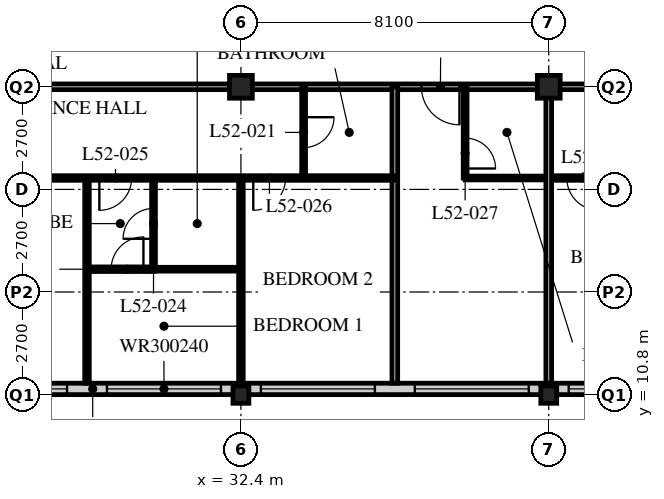
"""IFC4 building model, lengths in metres.
Left out: names, types, materials, properties, quantities, classifications, styles, units other than length and angle.
Written with IfcOpenShell. Run it as: python <this file> out.ifc"""

import sys

from ifc_helpers import new_model, si_unit, direction, frame, frame_2d, origin, origin_2d, place, context, subcontext, project, spatial, rectangle, hollow_rectangle, i_section, extrude, element, fill, save


model = new_model("IFC4")
c1 = context("Model", 3, precision=1e-05, world=origin(), true_north=direction((0.0, 1.0)))
c2 = subcontext(c1, "Body", "Model", "MODEL_VIEW")
j1 = project(units=[si_unit("LENGTHUNIT", "METRE"), si_unit("PLANEANGLEUNIT", "RADIAN")], contexts=[c1])
p1 = place(None, origin())
s1 = spatial("IfcSite", under=j1, at=p1, CompositionType="ELEMENT")
p2 = place(p1, origin())
s2 = spatial("IfcBuilding", under=s1, at=p2, CompositionType="ELEMENT")
p3 = place(p2, frame((0.0, 0.0, 202.8)))
s3 = spatial("IfcBuildingStorey", under=s2, at=p3, CompositionType="ELEMENT", Elevation=202.8)
p4 = place(p3, frame((32.4, 10.8, 0.0), z_axis=(0.0, 0.0, 1.0), x_axis=(1.0, 0.0, 0.0)))
e1 = element("IfcColumn", 1, at=p4, inside=s3, PredefinedType="COLUMN", context=c2, shape_type="SweptSolid", body=[
    extrude(i_section(OverallWidth=0.418, OverallDepth=0.456, WebThickness=0.042, FlangeThickness=0.067, FilletRadius=0.015, at=origin_2d()), origin(), (0.0, 0.0, 1.0), 3.6),
])
p5 = place(p3, frame((32.4, 18.9, 0.0), z_axis=(0.0, 0.0, 1.0), x_axis=(1.0, 0.0, 0.0)))
e2 = element("IfcColumn", 2, at=p5, inside=s3, PredefinedType="COLUMN", context=c2, shape_type="SweptSolid", body=[
    extrude(hollow_rectangle(XDim=0.6, YDim=0.6, WallThickness=0.05, at=origin_2d()), origin(), (0.0, 0.0, 1.0), 3.6),
])
p6 = place(p3, frame((40.5, 10.8, 0.0), z_axis=(0.0, 0.0, 1.0), x_axis=(1.0, 0.0, 0.0)))
e3 = element("IfcColumn", 3, at=p6, inside=s3, PredefinedType="COLUMN", context=c2, shape_type="SweptSolid", body=[
    extrude(i_section(OverallWidth=0.418, OverallDepth=0.456, WebThickness=0.042, FlangeThickness=0.067, FilletRadius=0.015, at=origin_2d()), origin(), (0.0, 0.0, 1.0), 3.6),
])
p7 = place(p3, frame((40.5, 18.9, 0.0), z_axis=(0.0, 0.0, 1.0), x_axis=(1.0, 0.0, 0.0)))
e4 = element("IfcColumn", 4, at=p7, inside=s3, PredefinedType="COLUMN", context=c2, shape_type="SweptSolid", body=[
    extrude(hollow_rectangle(XDim=0.6, YDim=0.6, WallThickness=0.05, at=origin_2d()), origin(), (0.0, 0.0, 1.0), 3.6),
])
p8 = place(p3, frame((8.4, 10.95, 0.0), z_axis=(0.0, 0.0, 1.0), x_axis=(1.0, 0.0, 0.0)))
e5 = element("IfcWall", 5, at=p8, inside=s3, PredefinedType="SOLIDWALL", context=c2, shape_type="SweptSolid", body=[
    extrude(rectangle(XDim=40.2, YDim=0.3, at=frame_2d((20.1, 0.0))), origin(), (0.0, 0.0, 1.0), 3.39),
])
p9 = place(p8, frame((0.225, 0.0, 0.6)))
e6 = element("IfcOpeningElement", 6, at=p9, cuts=e5, PredefinedType="OPENING", context=c2, shape_type="SweptSolid", body=[
    extrude(rectangle(XDim=3.0, YDim=2.4, at=frame_2d((1.5, 1.2))), frame((0.0, 0.16, 0.0), z_axis=(0.0, -1.0, 0.0), x_axis=(1.0, 0.0, 0.0)), (0.0, 0.0, 1.0), 0.32),
])
p10 = place(p8, frame((4.275, 0.0, 0.6)))
e7 = element("IfcOpeningElement", 7, at=p10, cuts=e5, PredefinedType="OPENING", context=c2, shape_type="SweptSolid", body=[
    extrude(rectangle(XDim=3.0, YDim=2.4, at=frame_2d((1.5, 1.2))), frame((0.0, 0.16, 0.0), z_axis=(0.0, -1.0, 0.0), x_axis=(1.0, 0.0, 0.0)), (0.0, 0.0, 1.0), 0.32),
])
p11 = place(p8, frame((8.325, 0.0, 0.6)))
e8 = element("IfcOpeningElement", 8, at=p11, cuts=e5, PredefinedType="OPENING", context=c2, shape_type="SweptSolid", body=[
    extrude(rectangle(XDim=3.0, YDim=2.4, at=frame_2d((1.5, 1.2))), frame((0.0, 0.16, 0.0), z_axis=(0.0, -1.0, 0.0), x_axis=(1.0, 0.0, 0.0)), (0.0, 0.0, 1.0), 0.32),
])
p12 = place(p8, frame((12.375, 0.0, 0.6)))
e9 = element("IfcOpeningElement", 9, at=p12, cuts=e5, PredefinedType="OPENING", context=c2, shape_type="SweptSolid", body=[
    extrude(rectangle(XDim=3.0, YDim=2.4, at=frame_2d((1.5, 1.2))), frame((0.0, 0.16, 0.0), z_axis=(0.0, -1.0, 0.0), x_axis=(1.0, 0.0, 0.0)), (0.0, 0.0, 1.0), 0.32),
])
p13 = place(p8, frame((16.425, 0.0, 0.6)))
e10 = element("IfcOpeningElement", 10, at=p13, cuts=e5, PredefinedType="OPENING", context=c2, shape_type="SweptSolid", body=[
    extrude(rectangle(XDim=3.0, YDim=2.4, at=frame_2d((1.5, 1.2))), frame((0.0, 0.16, 0.0), z_axis=(0.0, -1.0, 0.0), x_axis=(1.0, 0.0, 0.0)), (0.0, 0.0, 1.0), 0.32),
])
p14 = place(p8, frame((20.475, 0.0, 0.6)))
e11 = element("IfcOpeningElement", 11, at=p14, cuts=e5, PredefinedType="OPENING", context=c2, shape_type="SweptSolid", body=[
    extrude(rectangle(XDim=3.0, YDim=2.4, at=frame_2d((1.5, 1.2))), frame((0.0, 0.16, 0.0), z_axis=(0.0, -1.0, 0.0), x_axis=(1.0, 0.0, 0.0)), (0.0, 0.0, 1.0), 0.32),
])
p15 = place(p8, frame((24.525, 0.0, 0.6)))
e12 = element("IfcOpeningElement", 12, at=p15, cuts=e5, PredefinedType="OPENING", context=c2, shape_type="SweptSolid", body=[
    extrude(rectangle(XDim=3.0, YDim=2.4, at=frame_2d((1.5, 1.2))), frame((0.0, 0.16, 0.0), z_axis=(0.0, -1.0, 0.0), x_axis=(1.0, 0.0, 0.0)), (0.0, 0.0, 1.0), 0.32),
])
p16 = place(p8, frame((28.575, 0.0, 0.6)))
e13 = element("IfcOpeningElement", 13, at=p16, cuts=e5, PredefinedType="OPENING", context=c2, shape_type="SweptSolid", body=[
    extrude(rectangle(XDim=3.0, YDim=2.4, at=frame_2d((1.5, 1.2))), frame((0.0, 0.16, 0.0), z_axis=(0.0, -1.0, 0.0), x_axis=(1.0, 0.0, 0.0)), (0.0, 0.0, 1.0), 0.32),
])
p17 = place(p8, frame((32.625, 0.0, 0.6)))
e14 = element("IfcOpeningElement", 14, at=p17, cuts=e5, PredefinedType="OPENING", context=c2, shape_type="SweptSolid", body=[
    extrude(rectangle(XDim=3.0, YDim=2.4, at=frame_2d((1.5, 1.2))), frame((0.0, 0.16, 0.0), z_axis=(0.0, -1.0, 0.0), x_axis=(1.0, 0.0, 0.0)), (0.0, 0.0, 1.0), 0.32),
])
p18 = place(p8, frame((36.675, 0.0, 0.6)))
e15 = element("IfcOpeningElement", 15, at=p18, cuts=e5, PredefinedType="OPENING", context=c2, shape_type="SweptSolid", body=[
    extrude(rectangle(XDim=3.0, YDim=2.4, at=frame_2d((1.5, 1.2))), frame((0.0, 0.16, 0.0), z_axis=(0.0, -1.0, 0.0), x_axis=(1.0, 0.0, 0.0)), (0.0, 0.0, 1.0), 0.32),
])
p19 = place(p3, frame((8.1, 18.9, 0.0), z_axis=(0.0, 0.0, 1.0), x_axis=(1.0, 0.0, 0.0)))
e16 = element("IfcWall", 16, at=p19, inside=s3, PredefinedType="PARTITIONING", context=c2, shape_type="SweptSolid", body=[
    extrude(rectangle(XDim=36.45, YDim=0.15, at=frame_2d((18.225, 0.0))), origin(), (0.0, 0.0, 1.0), 2.778),
])
p20 = place(p19, frame((4.45, 0.0, 0.0)))
e17 = element("IfcOpeningElement", 17, at=p20, cuts=e16, PredefinedType="OPENING", context=c2, shape_type="SweptSolid", body=[
    extrude(rectangle(XDim=1.0, YDim=2.1, at=frame_2d((0.5, 1.05))), frame((0.0, 0.085, 0.0), z_axis=(0.0, -1.0, 0.0), x_axis=(1.0, 0.0, 0.0)), (0.0, 0.0, 1.0), 0.17),
])
p21 = place(p19, frame((12.55, 0.0, 0.0)))
e18 = element("IfcOpeningElement", 18, at=p21, cuts=e16, PredefinedType="OPENING", context=c2, shape_type="SweptSolid", body=[
    extrude(rectangle(XDim=1.0, YDim=2.1, at=frame_2d((0.5, 1.05))), frame((0.0, 0.085, 0.0), z_axis=(0.0, -1.0, 0.0), x_axis=(1.0, 0.0, 0.0)), (0.0, 0.0, 1.0), 0.17),
])
p22 = place(p19, frame((29.05, 0.0, 0.0)))
e19 = element("IfcOpeningElement", 19, at=p22, cuts=e16, PredefinedType="OPENING", context=c2, shape_type="SweptSolid", body=[
    extrude(rectangle(XDim=1.0, YDim=2.1, at=frame_2d((0.5, 1.05))), frame((0.0, 0.085, 0.0), z_axis=(0.0, -1.0, 0.0), x_axis=(1.0, 0.0, 0.0)), (0.0, 0.0, 1.0), 0.17),
])
p23 = place(p19, frame((2.625, 0.0, 0.0)))
e20 = element("IfcOpeningElement", 20, at=p23, cuts=e16, PredefinedType="OPENING", context=c2, shape_type="SweptSolid", body=[
    extrude(rectangle(XDim=1.0, YDim=2.1, at=frame_2d((0.5, 1.05))), frame((0.0, 0.085, 0.0), z_axis=(0.0, -1.0, 0.0), x_axis=(1.0, 0.0, 0.0)), (0.0, 0.0, 1.0), 0.17),
])
p24 = place(p19, frame((33.925, 0.0, 0.0)))
e21 = element("IfcOpeningElement", 21, at=p24, cuts=e16, PredefinedType="OPENING", context=c2, shape_type="SweptSolid", body=[
    extrude(rectangle(XDim=1.0, YDim=2.1, at=frame_2d((0.5, 1.05))), frame((0.0, 0.085, 0.0), z_axis=(0.0, -1.0, 0.0), x_axis=(1.0, 0.0, 0.0)), (0.0, 0.0, 1.0), 0.17),
])
p25 = place(p3, frame((34.05, 18.9, 0.0), z_axis=(0.0, 0.0, 1.0), x_axis=(0.0, -1.0, 0.0)))
e22 = element("IfcWall", 22, at=p25, inside=s3, PredefinedType="PARTITIONING", context=c2, shape_type="SweptSolid", body=[
    extrude(rectangle(XDim=2.4, YDim=0.1, at=frame_2d((1.2, 0.0))), origin(), (0.0, 0.0, 1.0), 3.39),
])
p26 = place(p25, frame((0.8, 0.0, 0.0)))
e23 = element("IfcOpeningElement", 23, at=p26, cuts=e22, PredefinedType="OPENING", context=c2, shape_type="SweptSolid", body=[
    extrude(rectangle(XDim=0.8, YDim=2.1, at=frame_2d((0.4, 1.05))), frame((0.0, 0.06, 0.0), z_axis=(0.0, -1.0, 0.0), x_axis=(1.0, 0.0, 0.0)), (0.0, 0.0, 1.0), 0.12),
])
p27 = place(p3, frame((30.1, 16.5, 0.0), z_axis=(0.0, 0.0, 1.0), x_axis=(0.0, -1.0, 0.0)))
e24 = element("IfcWall", 24, at=p27, inside=s3, PredefinedType="PARTITIONING", context=c2, shape_type="SweptSolid", body=[
    extrude(rectangle(XDim=2.4, YDim=0.1, at=frame_2d((1.2, 0.0))), origin(), (0.0, 0.0, 1.0), 3.39),
])
p28 = place(p27, frame((0.8, 0.0, 0.0)))
e25 = element("IfcOpeningElement", 25, at=p28, cuts=e24, PredefinedType="OPENING", context=c2, shape_type="SweptSolid", body=[
    extrude(rectangle(XDim=0.8, YDim=2.1, at=frame_2d((0.4, 1.05))), frame((0.0, 0.06, 0.0), z_axis=(0.0, -1.0, 0.0), x_axis=(1.0, 0.0, 0.0)), (0.0, 0.0, 1.0), 0.12),
])
p29 = place(p3, frame((30.1, 14.1, 0.0), z_axis=(0.0, 0.0, 1.0), x_axis=(1.0, 0.0, 0.0)))
e26 = element("IfcWall", 26, at=p29, inside=s3, PredefinedType="PARTITIONING", context=c2, shape_type="SweptSolid", body=[
    extrude(rectangle(XDim=2.3, YDim=0.1, at=frame_2d((1.15, 0.0))), origin(), (0.0, 0.0, 1.0), 3.39),
])
p30 = place(p3, frame((28.35, 16.5, 0.0), z_axis=(0.0, 0.0, 1.0), x_axis=(0.0, -1.0, 0.0)))
e27 = element("IfcWall", 27, at=p30, inside=s3, PredefinedType="PARTITIONING", context=c2, shape_type="SweptSolid", body=[
    extrude(rectangle(XDim=5.4, YDim=0.12, at=frame_2d((2.7, 0.0))), origin(), (0.0, 0.0, 1.0), 3.39),
])
p31 = place(p3, frame((32.4, 16.5, 0.0), z_axis=(0.0, 0.0, 1.0), x_axis=(0.0, -1.0, 0.0)))
e28 = element("IfcWall", 28, at=p31, inside=s3, PredefinedType="PARTITIONING", context=c2, shape_type="SweptSolid", body=[
    extrude(rectangle(XDim=5.4, YDim=0.12, at=frame_2d((2.7, 0.0))), origin(), (0.0, 0.0, 1.0), 2.778),
])
p32 = place(p3, frame((36.45, 18.9, 0.0), z_axis=(0.0, 0.0, 1.0), x_axis=(0.0, -1.0, 0.0)))
e29 = element("IfcWall", 29, at=p32, inside=s3, PredefinedType="PARTITIONING", context=c2, shape_type="SweptSolid", body=[
    extrude(rectangle(XDim=7.8, YDim=0.15, at=frame_2d((3.9, 0.0))), origin(), (0.0, 0.0, 1.0), 3.39),
])
p33 = place(p3, frame((38.3, 16.5, 0.0), z_axis=(0.0, 0.0, 1.0), x_axis=(1.0, 0.0, 0.0)))
e30 = element("IfcWall", 30, at=p33, inside=s3, PredefinedType="PARTITIONING", context=c2, shape_type="SweptSolid", body=[
    extrude(rectangle(XDim=2.2, YDim=0.1, at=frame_2d((1.1, 0.0))), origin(), (0.0, 0.0, 1.0), 3.39),
])
p34 = place(p3, frame((38.3, 18.9, 0.0), z_axis=(0.0, 0.0, 1.0), x_axis=(0.0, -1.0, 0.0)))
e31 = element("IfcWall", 31, at=p34, inside=s3, PredefinedType="PARTITIONING", context=c2, shape_type="SweptSolid", body=[
    extrude(rectangle(XDim=2.4, YDim=0.1, at=frame_2d((1.2, 0.0))), origin(), (0.0, 0.0, 1.0), 3.39),
])
p35 = place(p34, frame((1.35, 0.0, 0.0)))
e32 = element("IfcOpeningElement", 32, at=p35, cuts=e31, PredefinedType="OPENING", context=c2, shape_type="SweptSolid", body=[
    extrude(rectangle(XDim=0.8, YDim=2.1, at=frame_2d((0.4, 1.05))), frame((0.0, 0.06, 0.0), z_axis=(0.0, -1.0, 0.0), x_axis=(1.0, 0.0, 0.0)), (0.0, 0.0, 1.0), 0.12),
])
p36 = place(p3, frame((8.1, 16.5, 0.0), z_axis=(0.0, 0.0, 1.0), x_axis=(1.0, 0.0, 0.0)))
e33 = element("IfcWall", 33, at=p36, inside=s3, PredefinedType="PARTITIONING", context=c2, shape_type="SweptSolid", body=[
    extrude(rectangle(XDim=28.35, YDim=0.12, at=frame_2d((14.175, 0.0))), origin(), (0.0, 0.0, 1.0), 3.39),
])
p37 = place(p36, frame((5.025, 0.0, 0.0)))
e34 = element("IfcOpeningElement", 34, at=p37, cuts=e33, PredefinedType="OPENING", context=c2, shape_type="SweptSolid", body=[
    extrude(rectangle(XDim=0.85, YDim=2.1, at=frame_2d((0.425, 1.05))), frame((0.0, 0.07, 0.0), z_axis=(0.0, -1.0, 0.0), x_axis=(1.0, 0.0, 0.0)), (0.0, 0.0, 1.0), 0.14),
])
p38 = place(p36, frame((8.425, 0.0, 0.0)))
e35 = element("IfcOpeningElement", 35, at=p38, cuts=e33, PredefinedType="OPENING", context=c2, shape_type="SweptSolid", body=[
    extrude(rectangle(XDim=0.85, YDim=2.1, at=frame_2d((0.425, 1.05))), frame((0.0, 0.07, 0.0), z_axis=(0.0, -1.0, 0.0), x_axis=(1.0, 0.0, 0.0)), (0.0, 0.0, 1.0), 0.14),
])
p39 = place(p36, frame((13.125, 0.0, 0.0)))
e36 = element("IfcOpeningElement", 36, at=p39, cuts=e33, PredefinedType="OPENING", context=c2, shape_type="SweptSolid", body=[
    extrude(rectangle(XDim=0.85, YDim=2.1, at=frame_2d((0.425, 1.05))), frame((0.0, 0.07, 0.0), z_axis=(0.0, -1.0, 0.0), x_axis=(1.0, 0.0, 0.0)), (0.0, 0.0, 1.0), 0.14),
])
p40 = place(p36, frame((20.575, 0.0, 0.0)))
e37 = element("IfcOpeningElement", 37, at=p40, cuts=e33, PredefinedType="OPENING", context=c2, shape_type="SweptSolid", body=[
    extrude(rectangle(XDim=0.85, YDim=2.1, at=frame_2d((0.425, 1.05))), frame((0.0, 0.07, 0.0), z_axis=(0.0, -1.0, 0.0), x_axis=(1.0, 0.0, 0.0)), (0.0, 0.0, 1.0), 0.14),
])
p41 = place(p36, frame((24.625, 0.0, 0.0)))
e38 = element("IfcOpeningElement", 38, at=p41, cuts=e33, PredefinedType="OPENING", context=c2, shape_type="SweptSolid", body=[
    extrude(rectangle(XDim=0.85, YDim=2.1, at=frame_2d((0.425, 1.05))), frame((0.0, 0.07, 0.0), z_axis=(0.0, -1.0, 0.0), x_axis=(1.0, 0.0, 0.0)), (0.0, 0.0, 1.0), 0.14),
])
p42 = place(p36, frame((2.725, 0.0, 0.0)))
e39 = element("IfcOpeningElement", 39, at=p42, cuts=e33, PredefinedType="OPENING", context=c2, shape_type="SweptSolid", body=[
    extrude(rectangle(XDim=0.85, YDim=2.1, at=frame_2d((0.425, 1.05))), frame((0.0, 0.07, 0.0), z_axis=(0.0, -1.0, 0.0), x_axis=(1.0, 0.0, 0.0)), (0.0, 0.0, 1.0), 0.14),
])
p43 = place(p3, frame((40.5, 16.5, 0.0), z_axis=(0.0, 0.0, 1.0), x_axis=(1.0, 0.0, 0.0)))
e40 = element("IfcWall", 40, at=p43, inside=s3, PredefinedType="PARTITIONING", context=c2, shape_type="SweptSolid", body=[
    extrude(rectangle(XDim=8.05, YDim=0.12, at=frame_2d((4.025, 0.0))), origin(), (0.0, 0.0, 1.0), 3.39),
])
p44 = place(p43, frame((0.475, 0.0, 0.0)))
e41 = element("IfcOpeningElement", 41, at=p44, cuts=e40, PredefinedType="OPENING", context=c2, shape_type="SweptSolid", body=[
    extrude(rectangle(XDim=0.85, YDim=2.1, at=frame_2d((0.425, 1.05))), frame((0.0, 0.07, 0.0), z_axis=(0.0, -1.0, 0.0), x_axis=(1.0, 0.0, 0.0)), (0.0, 0.0, 1.0), 0.14),
])
p45 = place(p43, frame((4.325, 0.0, 0.0)))
e42 = element("IfcOpeningElement", 42, at=p45, cuts=e40, PredefinedType="OPENING", context=c2, shape_type="SweptSolid", body=[
    extrude(rectangle(XDim=0.85, YDim=2.1, at=frame_2d((0.425, 1.05))), frame((0.0, 0.07, 0.0), z_axis=(0.0, -1.0, 0.0), x_axis=(1.0, 0.0, 0.0)), (0.0, 0.0, 1.0), 0.14),
])
p46 = place(p3, frame((40.5, 18.9, 0.0), z_axis=(0.0, 0.0, 1.0), x_axis=(0.0, -1.0, 0.0)))
e43 = element("IfcWall", 43, at=p46, inside=s3, PredefinedType="PARTITIONING", context=c2, shape_type="SweptSolid", body=[
    extrude(rectangle(XDim=7.8, YDim=0.15, at=frame_2d((3.9, 0.0))), origin(), (0.0, 0.0, 1.0), 2.778),
])
p47 = place(p3, frame((30.11, 14.1, 0.0), z_axis=(0.0, 0.0, 1.0), x_axis=(-1.0, 0.0, 0.0)))
e44 = element("IfcWall", 44, at=p47, inside=s3, PredefinedType="PARTITIONING", context=c2, shape_type="SweptSolid", body=[
    extrude(rectangle(XDim=1.76, YDim=0.12, at=frame_2d((0.88, 0.0))), origin(), (0.0, 0.0, 1.0), 3.39),
])
p48 = place(p47, frame((0.275, 0.0, 0.0)))
e45 = element("IfcOpeningElement", 45, at=p48, cuts=e44, PredefinedType="OPENING", context=c2, shape_type="SweptSolid", body=[
    extrude(rectangle(XDim=0.85, YDim=2.1, at=frame_2d((0.425, 1.05))), frame((0.0, 0.07, 0.0), z_axis=(0.0, -1.0, 0.0), x_axis=(1.0, 0.0, 0.0)), (0.0, 0.0, 1.0), 0.14),
])
p49 = place(p13, origin())
e46 = element("IfcWindow", 46, at=p49, inside=s3, PartitioningType="SINGLE_PANEL", PredefinedType="WINDOW", context=c2, shape_type="SweptSolid", body=[
    extrude(rectangle(XDim=3.0, YDim=2.4, at=frame_2d((1.5, 1.2))), frame((0.0, 0.03, 0.0), z_axis=(0.0, -1.0, 0.0), x_axis=(1.0, 0.0, 0.0)), (0.0, 0.0, 1.0), 0.06),
])
fill(e10, e46)
p50 = place(p14, origin())
e47 = element("IfcWindow", 47, at=p50, inside=s3, PartitioningType="SINGLE_PANEL", PredefinedType="WINDOW", context=c2, shape_type="SweptSolid", body=[
    extrude(rectangle(XDim=3.0, YDim=2.4, at=frame_2d((1.5, 1.2))), frame((0.0, 0.03, 0.0), z_axis=(0.0, -1.0, 0.0), x_axis=(1.0, 0.0, 0.0)), (0.0, 0.0, 1.0), 0.06),
])
fill(e11, e47)
p51 = place(p15, origin())
e48 = element("IfcWindow", 48, at=p51, inside=s3, PartitioningType="SINGLE_PANEL", PredefinedType="WINDOW", context=c2, shape_type="SweptSolid", body=[
    extrude(rectangle(XDim=3.0, YDim=2.4, at=frame_2d((1.5, 1.2))), frame((0.0, 0.03, 0.0), z_axis=(0.0, -1.0, 0.0), x_axis=(1.0, 0.0, 0.0)), (0.0, 0.0, 1.0), 0.06),
])
fill(e12, e48)
p52 = place(p16, origin())
e49 = element("IfcWindow", 49, at=p52, inside=s3, PartitioningType="SINGLE_PANEL", PredefinedType="WINDOW", context=c2, shape_type="SweptSolid", body=[
    extrude(rectangle(XDim=3.0, YDim=2.4, at=frame_2d((1.5, 1.2))), frame((0.0, 0.03, 0.0), z_axis=(0.0, -1.0, 0.0), x_axis=(1.0, 0.0, 0.0)), (0.0, 0.0, 1.0), 0.06),
])
fill(e13, e49)
p53 = place(p17, origin())
e50 = element("IfcWindow", 50, at=p53, inside=s3, PartitioningType="SINGLE_PANEL", PredefinedType="WINDOW", context=c2, shape_type="SweptSolid", body=[
    extrude(rectangle(XDim=3.0, YDim=2.4, at=frame_2d((1.5, 1.2))), frame((0.0, 0.03, 0.0), z_axis=(0.0, -1.0, 0.0), x_axis=(1.0, 0.0, 0.0)), (0.0, 0.0, 1.0), 0.06),
])
fill(e14, e50)
p54 = place(p26, origin())
e51 = element("IfcDoor", 51, at=p54, inside=s3, OperationType="SINGLE_SWING_LEFT", PredefinedType="DOOR", context=c2, shape_type="SweptSolid", body=[
    extrude(rectangle(XDim=0.8, YDim=2.1, at=frame_2d((0.4, 1.05))), frame((0.0, 0.025, 0.0), z_axis=(0.0, -1.0, 0.0), x_axis=(1.0, 0.0, 0.0)), (0.0, 0.0, 1.0), 0.05),
])
fill(e23, e51)
p55 = place(p28, origin())
e52 = element("IfcDoor", 52, at=p55, inside=s3, OperationType="SINGLE_SWING_LEFT", PredefinedType="DOOR", context=c2, shape_type="SweptSolid", body=[
    extrude(rectangle(XDim=0.8, YDim=2.1, at=frame_2d((0.4, 1.05))), frame((0.0, 0.025, 0.0), z_axis=(0.0, -1.0, 0.0), x_axis=(1.0, 0.0, 0.0)), (0.0, 0.0, 1.0), 0.05),
])
fill(e25, e52)
p56 = place(p40, origin())
e53 = element("IfcDoor", 53, at=p56, inside=s3, OperationType="SINGLE_SWING_RIGHT", PredefinedType="DOOR", context=c2, shape_type="SweptSolid", body=[
    extrude(rectangle(XDim=0.85, YDim=2.1, at=frame_2d((0.425, 1.05))), frame((0.0, 0.025, 0.0), z_axis=(0.0, -1.0, 0.0), x_axis=(1.0, 0.0, 0.0)), (0.0, 0.0, 1.0), 0.05),
])
fill(e37, e53)
p57 = place(p41, origin())
e54 = element("IfcDoor", 54, at=p57, inside=s3, OperationType="SINGLE_SWING_RIGHT", PredefinedType="DOOR", context=c2, shape_type="SweptSolid", body=[
    extrude(rectangle(XDim=0.85, YDim=2.1, at=frame_2d((0.425, 1.05))), frame((0.0, 0.025, 0.0), z_axis=(0.0, -1.0, 0.0), x_axis=(1.0, 0.0, 0.0)), (0.0, 0.0, 1.0), 0.05),
])
fill(e38, e54)
p58 = place(p35, origin())
e55 = element("IfcDoor", 55, at=p58, inside=s3, OperationType="SINGLE_SWING_RIGHT", PredefinedType="DOOR", context=c2, shape_type="SweptSolid", body=[
    extrude(rectangle(XDim=0.8, YDim=2.1, at=frame_2d((0.4, 1.05))), frame((0.0, 0.025, 0.0), z_axis=(0.0, -1.0, 0.0), x_axis=(1.0, 0.0, 0.0)), (0.0, 0.0, 1.0), 0.05),
])
fill(e32, e55)
p59 = place(p22, origin())
e56 = element("IfcDoor", 56, at=p59, inside=s3, OperationType="SINGLE_SWING_LEFT", PredefinedType="DOOR", context=c2, shape_type="SweptSolid", body=[
    extrude(rectangle(XDim=1.0, YDim=2.1, at=frame_2d((0.5, 1.05))), frame((0.0, 0.025, 0.0), z_axis=(0.0, -1.0, 0.0), x_axis=(1.0, 0.0, 0.0)), (0.0, 0.0, 1.0), 0.05),
])
fill(e19, e56)
p60 = place(p44, origin())
e57 = element("IfcDoor", 57, at=p60, inside=s3, OperationType="SINGLE_SWING_LEFT", PredefinedType="DOOR", context=c2, shape_type="SweptSolid", body=[
    extrude(rectangle(XDim=0.85, YDim=2.1, at=frame_2d((0.425, 1.05))), frame((0.0, 0.025, 0.0), z_axis=(0.0, -1.0, 0.0), x_axis=(1.0, 0.0, 0.0)), (0.0, 0.0, 1.0), 0.05),
])
fill(e41, e57)
p61 = place(p48, origin())
e58 = element("IfcDoor", 58, at=p61, inside=s3, OperationType="SINGLE_SWING_RIGHT", PredefinedType="DOOR", context=c2, shape_type="SweptSolid", body=[
    extrude(rectangle(XDim=0.85, YDim=2.1, at=frame_2d((0.425, 1.05))), frame((0.0, 0.025, 0.0), z_axis=(0.0, -1.0, 0.0), x_axis=(1.0, 0.0, 0.0)), (0.0, 0.0, 1.0), 0.05),
])
fill(e45, e58)
save(model, sys.argv[1])
